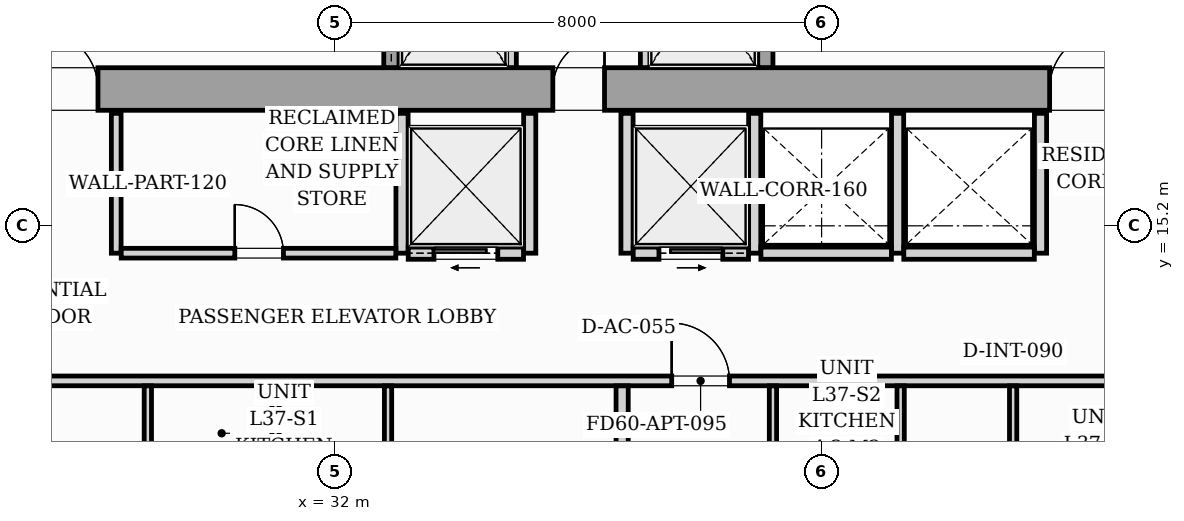
"""IFC4 building model, lengths in metres.
Left out: names, types, materials, properties, quantities, classifications, styles, units other than length and angle.
Written with IfcOpenShell. Run it as: python <this file> out.ifc"""

import sys

from ifc_helpers import new_model, si_unit, direction, frame, frame_2d, origin, origin_2d, place, context, subcontext, project, spatial, rectangle, i_section, extrude, source, transform, mapped, element, fill, save


model = new_model("IFC4")
c1 = context("Model", 3, precision=1e-05, world=origin(), true_north=direction((0.0, 1.0)))
c2 = subcontext(c1, "Body", "Model", "MODEL_VIEW")
j1 = project(units=[si_unit("LENGTHUNIT", "METRE"), si_unit("PLANEANGLEUNIT", "RADIAN")], contexts=[c1])
p1 = place(None, origin())
s1 = spatial("IfcSite", under=j1, at=p1, CompositionType="ELEMENT")
p2 = place(p1, origin())
s2 = spatial("IfcBuilding", under=s1, at=p2, CompositionType="ELEMENT")
p3 = place(p2, frame((0.0, 0.0, 131.0)))
s3 = spatial("IfcBuildingStorey", under=s2, at=p3, CompositionType="ELEMENT", Elevation=131.0)
m1 = source(origin(), c2, "Body", "SweptSolid", [
    extrude(i_section(OverallWidth=0.421, OverallDepth=0.465, WebThickness=0.045, FlangeThickness=0.073, FilletRadius=0.018, at=origin_2d()), origin(), (0.0, 0.0, 1.0), 3.196),
])
for number, where, z_axis, x_axis in (
    (1, (33.12, 17.4, 0.002), (0.0, 0.0, 1.0), (1.0, 0.0, 0.0)),
    (2, (38.88, 17.4, 0.002), (0.0, 0.0, 1.0), (1.0, 0.0, 0.0)),
):
    element("IfcColumn", number, at=place(p3, frame(where, z_axis=z_axis, x_axis=x_axis)), inside=s3, PredefinedType="PILASTER", context=c2, shape_type="MappedRepresentation", body=[
        mapped(m1, transform((0.0, 0.0, 0.0), scale=1.0)),
    ])
p4 = place(p3, frame((26.1, 17.45, 0.0), z_axis=(0.0, 0.0, 1.0), x_axis=(1.0, 0.0, 0.0)))
e3 = element("IfcWall", 3, at=p4, inside=s3, PredefinedType="SHEAR", context=c2, shape_type="SweptSolid", body=[
    extrude(rectangle(XDim=19.8, YDim=0.7, at=frame_2d((9.9, 0.0))), origin(), (0.0, 0.0, 1.0), 3.2),
])
p5 = place(p4, frame((1.05, 0.0, 0.0)))
e4 = element("IfcOpeningElement", 4, at=p5, cuts=e3, PredefinedType="OPENING", context=c2, shape_type="SweptSolid", body=[
    extrude(rectangle(XDim=0.95, YDim=2.06, at=frame_2d((0.475, 1.03))), frame((0.0, 0.36, 0.0), z_axis=(0.0, -1.0, 0.0), x_axis=(1.0, 0.0, 0.0)), (0.0, 0.0, 1.0), 0.72),
])
p6 = place(p4, frame((9.48, 0.0, 0.0)))
e5 = element("IfcOpeningElement", 5, at=p6, cuts=e3, PredefinedType="OPENING", context=c2, shape_type="SweptSolid", body=[
    extrude(rectangle(XDim=0.85, YDim=2.0, at=frame_2d((0.425, 1.0))), frame((0.0, 0.36, 0.0), z_axis=(0.0, -1.0, 0.0), x_axis=(1.0, 0.0, 0.0)), (0.0, 0.0, 1.0), 0.72),
])
p7 = place(p4, frame((17.65, 0.0, 0.0)))
e6 = element("IfcOpeningElement", 6, at=p7, cuts=e3, PredefinedType="OPENING", context=c2, shape_type="SweptSolid", body=[
    extrude(rectangle(XDim=0.95, YDim=2.06, at=frame_2d((0.475, 1.03))), frame((0.0, 0.36, 0.0), z_axis=(0.0, -1.0, 0.0), x_axis=(1.0, 0.0, 0.0)), (0.0, 0.0, 1.0), 0.72),
])
p8 = place(p3, frame((32.925, 17.802, 0.0), z_axis=(0.0, 0.0, 1.0), x_axis=(0.0, 1.0, 0.0)))
e7 = element("IfcWall", 7, at=p8, inside=s3, PredefinedType="SOLIDWALL", context=c2, shape_type="SweptSolid", body=[
    extrude(rectangle(XDim=2.646, YDim=0.25, at=frame_2d((1.323, 0.0))), origin(), (0.0, 0.0, 1.0), 3.2),
])
p9 = place(p8, frame((0.598, 0.0, 0.0)))
e8 = element("IfcOpeningElement", 8, at=p9, cuts=e7, PredefinedType="OPENING", context=c2, shape_type="SweptSolid", body=[
    extrude(rectangle(XDim=1.1, YDim=2.08, at=frame_2d((0.55, 1.04))), frame((0.0, 0.135, 0.0), z_axis=(0.0, -1.0, 0.0), x_axis=(1.0, 0.0, 0.0)), (0.0, 0.0, 1.0), 0.27),
])
for number, where, z_axis, x_axis in (
    (9, (34.9, 17.802, 0.0), (0.0, 0.0, 1.0), (0.0, 1.0, 0.0)),
    (10, (37.1, 17.802, 0.0), (0.0, 0.0, 1.0), (0.0, 1.0, 0.0)),
):
    element("IfcWall", number, at=place(p3, frame(where, z_axis=z_axis, x_axis=x_axis)), inside=s3, PredefinedType="PARTITIONING", context=c2, shape_type="SweptSolid", body=[
        extrude(rectangle(XDim=2.646, YDim=0.16, at=frame_2d((1.323, 0.0))), origin(), (0.0, 0.0, 1.0), 2.94),
    ])
p10 = place(p3, frame((39.075, 17.802, 0.0), z_axis=(0.0, 0.0, 1.0), x_axis=(0.0, 1.0, 0.0)))
e11 = element("IfcWall", 11, at=p10, inside=s3, PredefinedType="SOLIDWALL", context=c2, shape_type="SweptSolid", body=[
    extrude(rectangle(XDim=2.646, YDim=0.25, at=frame_2d((1.323, 0.0))), origin(), (0.0, 0.0, 1.0), 3.2),
])
p11 = place(p10, frame((0.598, 0.0, 0.0)))
e12 = element("IfcOpeningElement", 12, at=p11, cuts=e11, PredefinedType="OPENING", context=c2, shape_type="SweptSolid", body=[
    extrude(rectangle(XDim=1.1, YDim=2.08, at=frame_2d((0.55, 1.04))), frame((0.0, 0.135, 0.0), z_axis=(0.0, -1.0, 0.0), x_axis=(1.0, 0.0, 0.0)), (0.0, 0.0, 1.0), 0.27),
])
p12 = place(p3, frame((28.4, 14.75, 0.0), z_axis=(0.0, 0.0, 1.0), x_axis=(0.0, 1.0, 0.0)))
e13 = element("IfcWall", 13, at=p12, inside=s3, PredefinedType="PARTITIONING", context=c2, shape_type="SweptSolid", body=[
    extrude(rectangle(XDim=2.3, YDim=0.16, at=frame_2d((1.15, 0.0))), origin(), (0.0, 0.0, 1.0), 2.94),
])
p13 = place(p3, frame((33.1, 14.75, 0.0), z_axis=(0.0, 0.0, 1.0), x_axis=(0.0, 1.0, 0.0)))
e14 = element("IfcWall", 14, at=p13, inside=s3, PredefinedType="PARTITIONING", context=c2, shape_type="SweptSolid", body=[
    extrude(rectangle(XDim=2.3, YDim=0.2, at=frame_2d((1.15, 0.0))), origin(), (0.0, 0.0, 1.0), 2.94),
])
p14 = place(p3, frame((28.482, 14.75, 0.0), z_axis=(0.0, 0.0, 1.0), x_axis=(1.0, 0.0, 0.0)))
e15 = element("IfcWall", 15, at=p14, inside=s3, PredefinedType="PARTITIONING", context=c2, shape_type="SweptSolid", body=[
    extrude(rectangle(XDim=4.516, YDim=0.16, at=frame_2d((2.258, 0.0))), origin(), (0.0, 0.0, 1.0), 2.94),
])
p15 = place(p14, frame((1.868, 0.0, 0.0)))
e16 = element("IfcOpeningElement", 16, at=p15, cuts=e15, PredefinedType="OPENING", context=c2, shape_type="SweptSolid", body=[
    extrude(rectangle(XDim=0.8, YDim=2.05, at=frame_2d((0.4, 1.025))), frame((0.0, 0.09, 0.0), z_axis=(0.0, -1.0, 0.0), x_axis=(1.0, 0.0, 0.0)), (0.0, 0.0, 1.0), 0.18),
])
p16 = place(p3, frame((35.2, 14.75, 0.0), z_axis=(0.0, 0.0, 1.0), x_axis=(0.0, 1.0, 0.0)))
e17 = element("IfcWall", 17, at=p16, inside=s3, PredefinedType="PARTITIONING", context=c2, shape_type="SweptSolid", body=[
    extrude(rectangle(XDim=2.3, YDim=0.2, at=frame_2d((1.15, 0.0))), origin(), (0.0, 0.0, 1.0), 2.94),
])
p17 = place(p3, frame((33.202, 14.75, 0.0), z_axis=(0.0, 0.0, 1.0), x_axis=(1.0, 0.0, 0.0)))
e18 = element("IfcWall", 18, at=p17, inside=s3, PredefinedType="PARTITIONING", context=c2, shape_type="SweptSolid", body=[
    extrude(rectangle(XDim=1.896, YDim=0.2, at=frame_2d((0.948, 0.0))), origin(), (0.0, 0.0, 1.0), 2.94),
])
p18 = place(p17, frame((0.423, 0.0, 0.0)))
e19 = element("IfcOpeningElement", 19, at=p18, cuts=e18, PredefinedType="OPENING", context=c2, shape_type="SweptSolid", body=[
    extrude(rectangle(XDim=1.05, YDim=2.08, at=frame_2d((0.525, 1.04))), frame((0.0, 0.11, 0.0), z_axis=(0.0, -1.0, 0.0), x_axis=(1.0, 0.0, 0.0)), (0.0, 0.0, 1.0), 0.22),
])
for number, where, z_axis, x_axis in (
    (20, (36.8, 14.75, 0.0), (0.0, 0.0, 1.0), (0.0, 1.0, 0.0)),
    (21, (38.9, 14.75, 0.0), (0.0, 0.0, 1.0), (0.0, 1.0, 0.0)),
):
    element("IfcWall", number, at=place(p3, frame(where, z_axis=z_axis, x_axis=x_axis)), inside=s3, PredefinedType="PARTITIONING", context=c2, shape_type="SweptSolid", body=[
        extrude(rectangle(XDim=2.3, YDim=0.2, at=frame_2d((1.15, 0.0))), origin(), (0.0, 0.0, 1.0), 2.94),
    ])
p19 = place(p3, frame((36.902, 14.75, 0.0), z_axis=(0.0, 0.0, 1.0), x_axis=(1.0, 0.0, 0.0)))
e22 = element("IfcWall", 22, at=p19, inside=s3, PredefinedType="PARTITIONING", context=c2, shape_type="SweptSolid", body=[
    extrude(rectangle(XDim=1.896, YDim=0.2, at=frame_2d((0.948, 0.0))), origin(), (0.0, 0.0, 1.0), 2.94),
])
p20 = place(p19, frame((0.423, 0.0, 0.0)))
e23 = element("IfcOpeningElement", 23, at=p20, cuts=e22, PredefinedType="OPENING", context=c2, shape_type="SweptSolid", body=[
    extrude(rectangle(XDim=1.05, YDim=2.08, at=frame_2d((0.525, 1.04))), frame((0.0, 0.11, 0.0), z_axis=(0.0, -1.0, 0.0), x_axis=(1.0, 0.0, 0.0)), (0.0, 0.0, 1.0), 0.22),
])
for number, where, z_axis, x_axis in (
    (24, (41.25, 14.75, 0.0), (0.0, 0.0, 1.0), (0.0, 1.0, 0.0)),
    (25, (43.6, 14.75, 0.0), (0.0, 0.0, 1.0), (0.0, 1.0, 0.0)),
):
    element("IfcWall", number, at=place(p3, frame(where, z_axis=z_axis, x_axis=x_axis)), inside=s3, PredefinedType="PARTITIONING", context=c2, shape_type="SweptSolid", body=[
        extrude(rectangle(XDim=2.3, YDim=0.2, at=frame_2d((1.15, 0.0))), origin(), (0.0, 0.0, 1.0), 2.94),
    ])
for number, where, z_axis, x_axis in (
    (26, (39.002, 14.75, 0.0), (0.0, 0.0, 1.0), (1.0, 0.0, 0.0)),
    (27, (41.352, 14.75, 0.0), (0.0, 0.0, 1.0), (1.0, 0.0, 0.0)),
):
    element("IfcWall", number, at=place(p3, frame(where, z_axis=z_axis, x_axis=x_axis)), inside=s3, PredefinedType="PARTITIONING", context=c2, shape_type="SweptSolid", body=[
        extrude(rectangle(XDim=2.146, YDim=0.2, at=frame_2d((1.073, 0.0))), origin(), (0.0, 0.0, 1.0), 2.94),
    ])
p21 = place(p3, frame((22.05, 12.65, 0.0), z_axis=(0.0, 0.0, 1.0), x_axis=(1.0, 0.0, 0.0)))
e28 = element("IfcWall", 28, at=p21, inside=s3, PredefinedType="PARTITIONING", context=c2, shape_type="SweptSolid", body=[
    extrude(rectangle(XDim=23.83, YDim=0.16, at=frame_2d((11.915, 0.0))), origin(), (0.0, 0.0, 1.0), 2.94),
])
p22 = place(p21, frame((3.0, 0.0, 0.0)))
e29 = element("IfcOpeningElement", 29, at=p22, cuts=e28, PredefinedType="OPENING", context=c2, shape_type="SweptSolid", body=[
    extrude(rectangle(XDim=0.95, YDim=2.06, at=frame_2d((0.475, 1.03))), frame((0.0, 0.09, 0.0), z_axis=(0.0, -1.0, 0.0), x_axis=(1.0, 0.0, 0.0)), (0.0, 0.0, 1.0), 0.18),
])
p23 = place(p21, frame((15.485, 0.0, 0.0)))
e30 = element("IfcOpeningElement", 30, at=p23, cuts=e28, PredefinedType="OPENING", context=c2, shape_type="SweptSolid", body=[
    extrude(rectangle(XDim=0.95, YDim=2.06, at=frame_2d((0.475, 1.03))), frame((0.0, 0.09, 0.0), z_axis=(0.0, -1.0, 0.0), x_axis=(1.0, 0.0, 0.0)), (0.0, 0.0, 1.0), 0.18),
])
p24 = place(p3, frame((32.87, 7.028, 0.0), z_axis=(0.0, 0.0, 1.0), x_axis=(0.0, 1.0, 0.0)))
e31 = element("IfcWall", 31, at=p24, inside=s3, PredefinedType="PARTITIONING", context=c2, shape_type="SweptSolid", body=[
    extrude(rectangle(XDim=5.54, YDim=0.12, at=frame_2d((2.77, 0.0))), origin(), (0.0, 0.0, 1.0), 2.94),
])
p25 = place(p24, frame((2.272, 0.0, 0.0)))
e32 = element("IfcOpeningElement", 32, at=p25, cuts=e31, PredefinedType="OPENING", context=c2, shape_type="SweptSolid", body=[
    extrude(rectangle(XDim=0.9, YDim=2.05, at=frame_2d((0.45, 1.025))), frame((0.0, 0.07, 0.0), z_axis=(0.0, -1.0, 0.0), x_axis=(1.0, 0.0, 0.0)), (0.0, 0.0, 1.0), 0.14),
])
for number, where, z_axis, x_axis in (
    (33, (31.02, 10.462, 0.0), (0.0, 0.0, 1.0), (0.0, 1.0, 0.0)),
    (34, (28.92, 10.462, 0.0), (0.0, 0.0, 1.0), (0.0, 1.0, 0.0)),
):
    element("IfcWall", number, at=place(p3, frame(where, z_axis=z_axis, x_axis=x_axis)), inside=s3, PredefinedType="PARTITIONING", context=c2, shape_type="SweptSolid", body=[
        extrude(rectangle(XDim=2.106, YDim=0.12, at=frame_2d((1.053, 0.0))), origin(), (0.0, 0.0, 1.0), 2.94),
    ])
p26 = place(p3, frame((36.72, 6.658, 0.0), z_axis=(0.0, 0.0, 1.0), x_axis=(0.0, 1.0, 0.0)))
e35 = element("IfcWall", 35, at=p26, inside=s3, PredefinedType="PARTITIONING", context=c2, shape_type="SweptSolid", body=[
    extrude(rectangle(XDim=5.91, YDim=0.2, at=frame_2d((2.955, 0.0))), origin(), (0.0, 0.0, 1.0), 2.94),
])
p27 = place(p3, frame((43.15, 6.221, 0.0), z_axis=(0.0, 0.0, 1.0), x_axis=(0.0, 1.0, 0.0)))
e36 = element("IfcWall", 36, at=p27, inside=s3, PredefinedType="PARTITIONING", context=c2, shape_type="SweptSolid", body=[
    extrude(rectangle(XDim=6.347, YDim=0.12, at=frame_2d((3.173, 0.0))), origin(), (0.0, 0.0, 1.0), 2.94),
])
p28 = place(p27, frame((3.079, 0.0, 0.0)))
e37 = element("IfcOpeningElement", 37, at=p28, cuts=e36, PredefinedType="OPENING", context=c2, shape_type="SweptSolid", body=[
    extrude(rectangle(XDim=0.9, YDim=2.05, at=frame_2d((0.45, 1.025))), frame((0.0, 0.07, 0.0), z_axis=(0.0, -1.0, 0.0), x_axis=(1.0, 0.0, 0.0)), (0.0, 0.0, 1.0), 0.14),
])
for number, where, z_axis, x_axis in (
    (38, (41.3, 10.462, 0.0), (0.0, 0.0, 1.0), (0.0, 1.0, 0.0)),
    (39, (39.2, 10.462, 0.0), (0.0, 0.0, 1.0), (0.0, 1.0, 0.0)),
):
    element("IfcWall", number, at=place(p3, frame(where, z_axis=z_axis, x_axis=x_axis)), inside=s3, PredefinedType="PARTITIONING", context=c2, shape_type="SweptSolid", body=[
        extrude(rectangle(XDim=2.106, YDim=0.12, at=frame_2d((1.053, 0.0))), origin(), (0.0, 0.0, 1.0), 2.94),
    ])
m2 = source(origin(), c2, "Body", "SweptSolid", [
    extrude(rectangle(XDim=0.95, YDim=2.06, at=frame_2d((0.475, 1.03))), frame((0.0, 0.025, 0.0), z_axis=(0.0, -1.0, 0.0), x_axis=(1.0, 0.0, 0.0)), (0.0, 0.0, 1.0), 0.05),
])
p29 = place(p5, origin())
e40 = element("IfcDoor", 40, at=p29, inside=s3, OperationType="SINGLE_SWING_LEFT", PredefinedType="DOOR", context=c2, shape_type="MappedRepresentation", body=[
    mapped(m2, transform((0.0, 0.0, 0.0), scale=1.0)),
])
fill(e4, e40)
m3 = source(origin(), c2, "Body", "SweptSolid", [
    extrude(rectangle(XDim=0.85, YDim=2.0, at=frame_2d((0.425, 1.0))), frame((0.0, 0.025, 0.0), z_axis=(0.0, -1.0, 0.0), x_axis=(1.0, 0.0, 0.0)), (0.0, 0.0, 1.0), 0.05),
])
p30 = place(p6, origin())
e41 = element("IfcDoor", 41, at=p30, inside=s3, OperationType="SINGLE_SWING_RIGHT", PredefinedType="DOOR", context=c2, shape_type="MappedRepresentation", body=[
    mapped(m3, transform((0.0, 0.0, 0.0), scale=1.0)),
])
fill(e5, e41)
p31 = place(p7, origin())
e42 = element("IfcDoor", 42, at=p31, inside=s3, OperationType="SINGLE_SWING_RIGHT", PredefinedType="DOOR", context=c2, shape_type="MappedRepresentation", body=[
    mapped(m2, transform((0.0, 0.0, 0.0), scale=1.0)),
])
fill(e6, e42)
m4 = source(origin(), c2, "Body", "SweptSolid", [
    extrude(rectangle(XDim=0.8, YDim=2.05, at=frame_2d((0.4, 1.025))), frame((0.0, 0.025, 0.0), z_axis=(0.0, -1.0, 0.0), x_axis=(1.0, 0.0, 0.0)), (0.0, 0.0, 1.0), 0.05),
])
p32 = place(p15, origin())
e43 = element("IfcDoor", 43, at=p32, inside=s3, OperationType="SINGLE_SWING_LEFT", PredefinedType="DOOR", context=c2, shape_type="MappedRepresentation", body=[
    mapped(m4, transform((0.0, 0.0, 0.0), scale=1.0)),
])
fill(e16, e43)
m5 = source(origin(), c2, "Body", "SweptSolid", [
    extrude(rectangle(XDim=1.05, YDim=2.08, at=frame_2d((0.525, 1.04))), frame((0.0, 0.025, 0.0), z_axis=(0.0, -1.0, 0.0), x_axis=(1.0, 0.0, 0.0)), (0.0, 0.0, 1.0), 0.05),
])
p33 = place(p18, origin())
e44 = element("IfcDoor", 44, at=p33, inside=s3, OperationType="SLIDING_TO_LEFT", PredefinedType="DOOR", context=c2, shape_type="MappedRepresentation", body=[
    mapped(m5, transform((0.0, 0.0, 0.0), scale=1.0)),
])
fill(e19, e44)
p34 = place(p20, origin())
e45 = element("IfcDoor", 45, at=p34, inside=s3, OperationType="SLIDING_TO_RIGHT", PredefinedType="DOOR", context=c2, shape_type="MappedRepresentation", body=[
    mapped(m5, transform((0.0, 0.0, 0.0), scale=1.0)),
])
fill(e23, e45)
m6 = source(origin(), c2, "Body", "SweptSolid", [
    extrude(rectangle(XDim=0.95, YDim=2.06, at=frame_2d((0.475, 1.03))), frame((0.0, 0.025, 0.0), z_axis=(0.0, -1.0, 0.0), x_axis=(1.0, 0.0, 0.0)), (0.0, 0.0, 1.0), 0.05),
])
p35 = place(p23, origin())
e46 = element("IfcDoor", 46, at=p35, inside=s3, OperationType="SINGLE_SWING_LEFT", PredefinedType="DOOR", context=c2, shape_type="MappedRepresentation", body=[
    mapped(m6, transform((0.0, 0.0, 0.0), scale=1.0)),
])
fill(e30, e46)
save(model, sys.argv[1])
